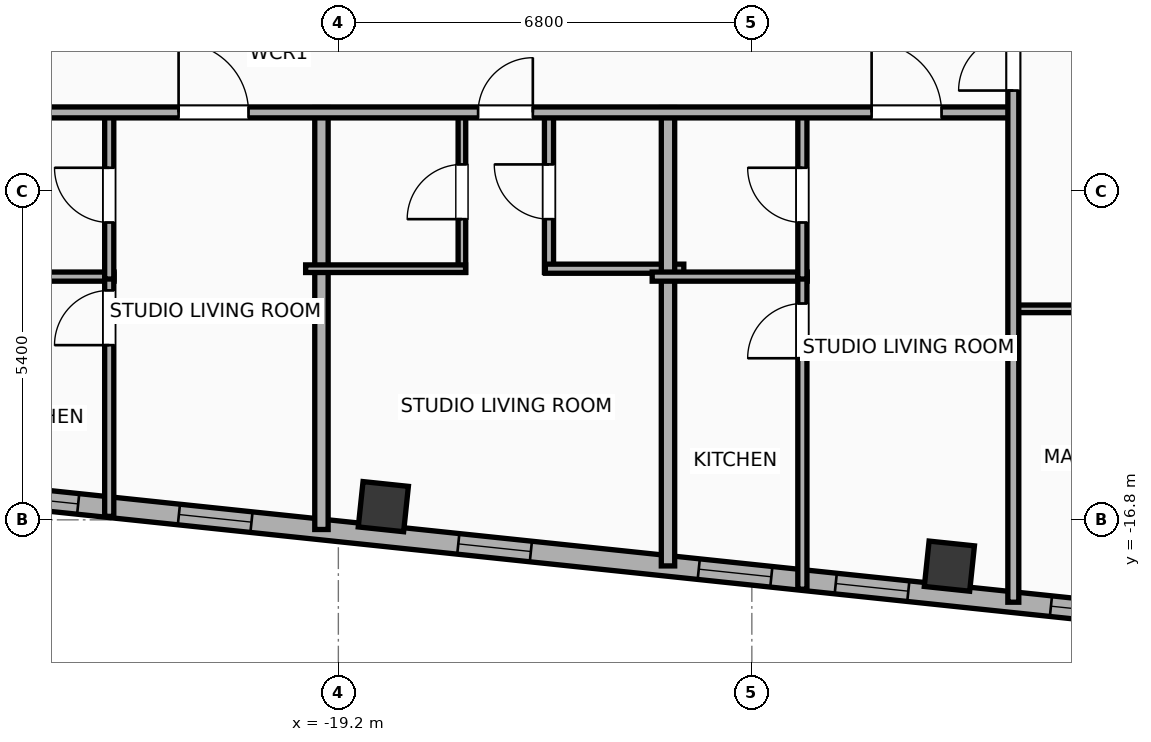
"""IFC4 building model, lengths in metres.
Left out: names, types, materials, properties, quantities, classifications, styles, units other than length and angle.
Written with IfcOpenShell. Run it as: python <this file> out.ifc"""

import sys

from ifc_helpers import new_model, si_unit, direction, frame, frame_2d, origin, origin_2d, place, context, subcontext, project, spatial, rectangle, hollow_rectangle, extrude, element, fill, save


model = new_model("IFC4")
c1 = context("Model", 3, precision=1e-05, world=origin(), true_north=direction((0.0, 1.0)))
c2 = subcontext(c1, "Body", "Model", "MODEL_VIEW")
j1 = project(units=[si_unit("LENGTHUNIT", "METRE"), si_unit("PLANEANGLEUNIT", "RADIAN")], contexts=[c1])
p1 = place(None, origin())
s1 = spatial("IfcSite", under=j1, at=p1, CompositionType="ELEMENT")
p2 = place(p1, origin())
s2 = spatial("IfcBuilding", under=s1, at=p2, CompositionType="ELEMENT")
p3 = place(p2, frame((0.0, 0.0, 299.0)))
s3 = spatial("IfcBuildingStorey", under=s2, at=p3, CompositionType="ELEMENT", Elevation=299.0)
for number, where, z_axis, x_axis in (
    (1, (-18.46, -16.583, 0.0), (0.0, 0.0, 1.0), (0.995, -0.105, 0.0)),
    (2, (-9.152, -17.561, 0.0), (0.0, 0.0, 1.0), (0.995, -0.105, 0.0)),
):
    element("IfcColumn", number, at=place(p3, frame(where, z_axis=z_axis, x_axis=x_axis)), inside=s3, PredefinedType="COLUMN", context=c2, shape_type="SweptSolid", body=[
        extrude(hollow_rectangle(XDim=0.75, YDim=0.75, WallThickness=0.025, at=origin_2d()), origin(), (0.0, 0.0, 1.0), 3.9),
    ])
p4 = place(p3, frame((18.708, -20.972, 0.0), z_axis=(0.0, 0.0, 1.0), x_axis=(-0.994521888554, 0.104528528102, 0.0)))
e3 = element("IfcWall", 3, at=p4, inside=s3, PredefinedType="ELEMENTEDWALL", context=c2, shape_type="SweptSolid", body=[
    extrude(rectangle(XDim=46.766, YDim=0.34, at=frame_2d((23.383, 0.0))), origin(), (0.0, 0.0, 1.0), 3.635),
])
p5 = place(p4, frame((23.733, 0.0, 0.65)))
e4 = element("IfcOpeningElement", 4, at=p5, cuts=e3, PredefinedType="OPENING", context=c2, shape_type="SweptSolid", body=[
    extrude(rectangle(XDim=2.6, YDim=2.45, at=frame_2d((1.3, 1.225))), frame((0.0, 0.18, 0.0), z_axis=(0.0, -1.0, 0.0), x_axis=(1.0, 0.0, 0.0)), (0.0, 0.0, 1.0), 0.36),
])
p6 = place(p4, frame((44.402, 0.0, 0.75)))
e5 = element("IfcOpeningElement", 5, at=p6, cuts=e3, PredefinedType="OPENING", context=c2, shape_type="SweptSolid", body=[
    extrude(rectangle(XDim=1.2, YDim=2.05, at=frame_2d((0.6, 1.025))), frame((0.0, 0.18, 0.0), z_axis=(0.0, -1.0, 0.0), x_axis=(1.0, 0.0, 0.0)), (0.0, 0.0, 1.0), 0.36),
])
p7 = place(p4, frame((39.553, 0.0, 0.75)))
e6 = element("IfcOpeningElement", 6, at=p7, cuts=e3, PredefinedType="OPENING", context=c2, shape_type="SweptSolid", body=[
    extrude(rectangle(XDim=1.2, YDim=2.05, at=frame_2d((0.6, 1.025))), frame((0.0, 0.18, 0.0), z_axis=(0.0, -1.0, 0.0), x_axis=(1.0, 0.0, 0.0)), (0.0, 0.0, 1.0), 0.36),
])
p8 = place(p4, frame((42.419, 0.0, 0.75)))
e7 = element("IfcOpeningElement", 7, at=p8, cuts=e3, PredefinedType="OPENING", context=c2, shape_type="SweptSolid", body=[
    extrude(rectangle(XDim=1.2, YDim=2.05, at=frame_2d((0.6, 1.025))), frame((0.0, 0.18, 0.0), z_axis=(0.0, -1.0, 0.0), x_axis=(1.0, 0.0, 0.0)), (0.0, 0.0, 1.0), 0.36),
])
p9 = place(p4, frame((34.933, 0.0, 0.75)))
e8 = element("IfcOpeningElement", 8, at=p9, cuts=e3, PredefinedType="OPENING", context=c2, shape_type="SweptSolid", body=[
    extrude(rectangle(XDim=1.2, YDim=2.05, at=frame_2d((0.6, 1.025))), frame((0.0, 0.18, 0.0), z_axis=(0.0, -1.0, 0.0), x_axis=(1.0, 0.0, 0.0)), (0.0, 0.0, 1.0), 0.36),
])
p10 = place(p4, frame((28.692, 0.0, 0.75)))
e9 = element("IfcOpeningElement", 9, at=p10, cuts=e3, PredefinedType="OPENING", context=c2, shape_type="SweptSolid", body=[
    extrude(rectangle(XDim=1.2, YDim=2.05, at=frame_2d((0.6, 1.025))), frame((0.0, 0.18, 0.0), z_axis=(0.0, -1.0, 0.0), x_axis=(1.0, 0.0, 0.0)), (0.0, 0.0, 1.0), 0.36),
])
p11 = place(p4, frame((30.957, 0.0, 0.75)))
e10 = element("IfcOpeningElement", 10, at=p11, cuts=e3, PredefinedType="OPENING", context=c2, shape_type="SweptSolid", body=[
    extrude(rectangle(XDim=1.2, YDim=2.05, at=frame_2d((0.6, 1.025))), frame((0.0, 0.18, 0.0), z_axis=(0.0, -1.0, 0.0), x_axis=(1.0, 0.0, 0.0)), (0.0, 0.0, 1.0), 0.36),
])
p12 = place(p4, frame((7.492, 0.0, 0.75)))
e11 = element("IfcOpeningElement", 11, at=p12, cuts=e3, PredefinedType="OPENING", context=c2, shape_type="SweptSolid", body=[
    extrude(rectangle(XDim=1.2, YDim=2.05, at=frame_2d((0.6, 1.025))), frame((0.0, 0.18, 0.0), z_axis=(0.0, -1.0, 0.0), x_axis=(1.0, 0.0, 0.0)), (0.0, 0.0, 1.0), 0.36),
])
p13 = place(p4, frame((4.141, 0.0, 0.75)))
e12 = element("IfcOpeningElement", 12, at=p13, cuts=e3, PredefinedType="OPENING", context=c2, shape_type="SweptSolid", body=[
    extrude(rectangle(XDim=1.2, YDim=2.05, at=frame_2d((0.6, 1.025))), frame((0.0, 0.18, 0.0), z_axis=(0.0, -1.0, 0.0), x_axis=(1.0, 0.0, 0.0)), (0.0, 0.0, 1.0), 0.36),
])
p14 = place(p4, frame((1.36, 0.0, 0.75)))
e13 = element("IfcOpeningElement", 13, at=p14, cuts=e3, PredefinedType="OPENING", context=c2, shape_type="SweptSolid", body=[
    extrude(rectangle(XDim=1.2, YDim=2.05, at=frame_2d((0.6, 1.025))), frame((0.0, 0.18, 0.0), z_axis=(0.0, -1.0, 0.0), x_axis=(1.0, 0.0, 0.0)), (0.0, 0.0, 1.0), 0.36),
])
p15 = place(p4, frame((20.254, 0.0, 0.75)))
e14 = element("IfcOpeningElement", 14, at=p15, cuts=e3, PredefinedType="OPENING", context=c2, shape_type="SweptSolid", body=[
    extrude(rectangle(XDim=1.2, YDim=2.05, at=frame_2d((0.6, 1.025))), frame((0.0, 0.18, 0.0), z_axis=(0.0, -1.0, 0.0), x_axis=(1.0, 0.0, 0.0)), (0.0, 0.0, 1.0), 0.36),
])
p16 = place(p4, frame((16.172, 0.0, 0.75)))
e15 = element("IfcOpeningElement", 15, at=p16, cuts=e3, PredefinedType="OPENING", context=c2, shape_type="SweptSolid", body=[
    extrude(rectangle(XDim=1.2, YDim=2.05, at=frame_2d((0.6, 1.025))), frame((0.0, 0.18, 0.0), z_axis=(0.0, -1.0, 0.0), x_axis=(1.0, 0.0, 0.0)), (0.0, 0.0, 1.0), 0.36),
])
p17 = place(p4, frame((12.11, 0.0, 0.75)))
e16 = element("IfcOpeningElement", 16, at=p17, cuts=e3, PredefinedType="OPENING", context=c2, shape_type="SweptSolid", body=[
    extrude(rectangle(XDim=1.2, YDim=2.05, at=frame_2d((0.6, 1.025))), frame((0.0, 0.18, 0.0), z_axis=(0.0, -1.0, 0.0), x_axis=(1.0, 0.0, 0.0)), (0.0, 0.0, 1.0), 0.36),
])
p18 = place(p3, frame((-25.438, -12.8, 0.0), z_axis=(0.0, 0.0, 1.0), x_axis=(1.0, 0.0, 0.0)))
e17 = element("IfcWall", 17, at=p18, inside=s3, PredefinedType="PLUMBINGWALL", context=c2, shape_type="SweptSolid", body=[
    extrude(rectangle(XDim=2.55, YDim=0.15, at=frame_2d((1.275, 0.0))), origin(), (0.0, 0.0, 1.0), 3.635),
])
p19 = place(p3, frame((-22.968, -16.743, 0.0), z_axis=(0.0, 0.0, 1.0), x_axis=(0.0, 1.0, 0.0)))
e18 = element("IfcWall", 18, at=p19, inside=s3, PredefinedType="PLUMBINGWALL", context=c2, shape_type="SweptSolid", body=[
    extrude(rectangle(XDim=3.983, YDim=0.15, at=frame_2d((1.991, 0.0))), origin(), (0.0, 0.0, 1.0), 3.635),
])
p20 = place(p19, frame((2.816, 0.0, 0.0)))
e19 = element("IfcOpeningElement", 19, at=p20, cuts=e18, PredefinedType="OPENING", context=c2, shape_type="SweptSolid", body=[
    extrude(rectangle(XDim=0.9, YDim=2.05, at=frame_2d((0.45, 1.025))), frame((0.0, 0.085, 0.0), z_axis=(0.0, -1.0, 0.0), x_axis=(1.0, 0.0, 0.0)), (0.0, 0.0, 1.0), 0.17),
])
p21 = place(p3, frame((-22.968, -12.84, 0.0), z_axis=(0.0, 0.0, 1.0), x_axis=(0.0, 1.0, 0.0)))
e20 = element("IfcWall", 20, at=p21, inside=s3, PredefinedType="PLUMBINGWALL", context=c2, shape_type="SweptSolid", body=[
    extrude(rectangle(XDim=2.76, YDim=0.15, at=frame_2d((1.38, 0.0))), origin(), (0.0, 0.0, 1.0), 3.635),
])
p22 = place(p21, frame((0.93, 0.0, 0.0)))
e21 = element("IfcOpeningElement", 21, at=p22, cuts=e20, PredefinedType="OPENING", context=c2, shape_type="SweptSolid", body=[
    extrude(rectangle(XDim=0.9, YDim=2.05, at=frame_2d((0.45, 1.025))), frame((0.0, 0.085, 0.0), z_axis=(0.0, -1.0, 0.0), x_axis=(1.0, 0.0, 0.0)), (0.0, 0.0, 1.0), 0.17),
])
p23 = place(p3, frame((-19.478, -16.959, 0.0), z_axis=(0.0, 0.0, 1.0), x_axis=(0.0, 1.0, 0.0)))
e22 = element("IfcWall", 22, at=p23, inside=s3, PredefinedType="PARTITIONING", context=c2, shape_type="SweptSolid", body=[
    extrude(rectangle(XDim=6.939, YDim=0.22, at=frame_2d((3.469, 0.0))), origin(), (0.0, 0.0, 1.0), 3.635),
])
p24 = place(p3, frame((-17.168, -12.73, 0.0), z_axis=(0.0, 0.0, 1.0), x_axis=(0.0, 1.0, 0.0)))
e23 = element("IfcWall", 23, at=p24, inside=s3, PredefinedType="PARTITIONING", context=c2, shape_type="SweptSolid", body=[
    extrude(rectangle(XDim=2.65, YDim=0.125, at=frame_2d((1.325, 0.0))), origin(), (0.0, 0.0, 1.0), 3.635),
])
p25 = place(p24, frame((0.875, 0.0, 0.0)))
e24 = element("IfcOpeningElement", 24, at=p25, cuts=e23, PredefinedType="OPENING", context=c2, shape_type="SweptSolid", body=[
    extrude(rectangle(XDim=0.9, YDim=2.05, at=frame_2d((0.45, 1.025))), frame((0.0, 0.073, 0.0), z_axis=(0.0, -1.0, 0.0), x_axis=(1.0, 0.0, 0.0)), (0.0, 0.0, 1.0), 0.145),
])
p26 = place(p3, frame((-15.736, -12.73, 0.0), z_axis=(0.0, 0.0, 1.0), x_axis=(0.0, 1.0, 0.0)))
e25 = element("IfcWall", 25, at=p26, inside=s3, PredefinedType="PLUMBINGWALL", context=c2, shape_type="SweptSolid", body=[
    extrude(rectangle(XDim=2.65, YDim=0.15, at=frame_2d((1.325, 0.0))), origin(), (0.0, 0.0, 1.0), 3.635),
])
p27 = place(p26, frame((0.875, 0.0, 0.0)))
e26 = element("IfcOpeningElement", 26, at=p27, cuts=e25, PredefinedType="OPENING", context=c2, shape_type="SweptSolid", body=[
    extrude(rectangle(XDim=0.9, YDim=2.05, at=frame_2d((0.45, 1.025))), frame((0.0, 0.085, 0.0), z_axis=(0.0, -1.0, 0.0), x_axis=(1.0, 0.0, 0.0)), (0.0, 0.0, 1.0), 0.17),
])
p28 = place(p3, frame((-19.738, -12.67, 0.0), z_axis=(0.0, 0.0, 1.0), x_axis=(1.0, 0.0, 0.0)))
e27 = element("IfcWall", 27, at=p28, inside=s3, PredefinedType="PARTITIONING", context=c2, shape_type="SweptSolid", body=[
    extrude(rectangle(XDim=2.63, YDim=0.125, at=frame_2d((1.315, 0.0))), origin(), (0.0, 0.0, 1.0), 3.635),
])
p29 = place(p3, frame((-15.796, -12.67, 0.0), z_axis=(0.0, 0.0, 1.0), x_axis=(1.0, 0.0, 0.0)))
e28 = element("IfcWall", 28, at=p29, inside=s3, PredefinedType="PLUMBINGWALL", context=c2, shape_type="SweptSolid", body=[
    extrude(rectangle(XDim=2.277, YDim=0.15, at=frame_2d((1.138, 0.0))), origin(), (0.0, 0.0, 1.0), 3.635),
])
p30 = place(p3, frame((-13.779, -17.558, 0.0), z_axis=(0.0, 0.0, 1.0), x_axis=(0.0, 1.0, 0.0)))
e29 = element("IfcWall", 29, at=p30, inside=s3, PredefinedType="PARTITIONING", context=c2, shape_type="SweptSolid", body=[
    extrude(rectangle(XDim=7.538, YDim=0.22, at=frame_2d((3.769, 0.0))), origin(), (0.0, 0.0, 1.0), 3.635),
])
p31 = place(p3, frame((-14.039, -12.8, 0.0), z_axis=(0.0, 0.0, 1.0), x_axis=(1.0, 0.0, 0.0)))
e30 = element("IfcWall", 30, at=p31, inside=s3, PredefinedType="PLUMBINGWALL", context=c2, shape_type="SweptSolid", body=[
    extrude(rectangle(XDim=2.55, YDim=0.15, at=frame_2d((1.275, 0.0))), origin(), (0.0, 0.0, 1.0), 3.635),
])
p32 = place(p3, frame((-11.569, -17.941, 0.0), z_axis=(0.0, 0.0, 1.0), x_axis=(0.0, 1.0, 0.0)))
e31 = element("IfcWall", 31, at=p32, inside=s3, PredefinedType="PLUMBINGWALL", context=c2, shape_type="SweptSolid", body=[
    extrude(rectangle(XDim=5.181, YDim=0.15, at=frame_2d((2.59, 0.0))), origin(), (0.0, 0.0, 1.0), 3.635),
])
p33 = place(p32, frame((3.798, 0.0, 0.0)))
e32 = element("IfcOpeningElement", 32, at=p33, cuts=e31, PredefinedType="OPENING", context=c2, shape_type="SweptSolid", body=[
    extrude(rectangle(XDim=0.9, YDim=2.05, at=frame_2d((0.45, 1.025))), frame((0.0, 0.085, 0.0), z_axis=(0.0, -1.0, 0.0), x_axis=(1.0, 0.0, 0.0)), (0.0, 0.0, 1.0), 0.17),
])
p34 = place(p3, frame((-11.569, -12.84, 0.0), z_axis=(0.0, 0.0, 1.0), x_axis=(0.0, 1.0, 0.0)))
e33 = element("IfcWall", 33, at=p34, inside=s3, PredefinedType="PLUMBINGWALL", context=c2, shape_type="SweptSolid", body=[
    extrude(rectangle(XDim=2.76, YDim=0.15, at=frame_2d((1.38, 0.0))), origin(), (0.0, 0.0, 1.0), 3.075),
])
p35 = place(p34, frame((0.93, 0.0, 0.0)))
e34 = element("IfcOpeningElement", 34, at=p35, cuts=e33, PredefinedType="OPENING", context=c2, shape_type="SweptSolid", body=[
    extrude(rectangle(XDim=0.9, YDim=2.05, at=frame_2d((0.45, 1.025))), frame((0.0, 0.085, 0.0), z_axis=(0.0, -1.0, 0.0), x_axis=(1.0, 0.0, 0.0)), (0.0, 0.0, 1.0), 0.17),
])
p36 = place(p3, frame((-30.639, -10.1, 0.0), z_axis=(0.0, 0.0, 1.0), x_axis=(1.0, 0.0, 0.0)))
e35 = element("IfcWall", 35, at=p36, inside=s3, PredefinedType="PARTITIONING", context=c2, shape_type="SweptSolid", body=[
    extrude(rectangle(XDim=22.559, YDim=0.18, at=frame_2d((11.28, 0.0))), origin(), (0.0, 0.0, 1.0), 3.635),
])
p37 = place(p36, frame((2.298, 0.0, 0.0)))
e36 = element("IfcOpeningElement", 36, at=p37, cuts=e35, PredefinedType="OPENING", context=c2, shape_type="SweptSolid", body=[
    extrude(rectangle(XDim=0.9, YDim=2.05, at=frame_2d((0.45, 1.025))), frame((0.0, 0.1, 0.0), z_axis=(0.0, -1.0, 0.0), x_axis=(1.0, 0.0, 0.0)), (0.0, 0.0, 1.0), 0.2),
])
p38 = place(p36, frame((8.812, 0.0, 0.0)))
e37 = element("IfcOpeningElement", 37, at=p38, cuts=e35, PredefinedType="OPENING", context=c2, shape_type="SweptSolid", body=[
    extrude(rectangle(XDim=1.15, YDim=2.05, at=frame_2d((0.575, 1.025))), frame((0.0, 0.1, 0.0), z_axis=(0.0, -1.0, 0.0), x_axis=(1.0, 0.0, 0.0)), (0.0, 0.0, 1.0), 0.2),
])
p39 = place(p36, frame((13.738, 0.0, 0.0)))
e38 = element("IfcOpeningElement", 38, at=p39, cuts=e35, PredefinedType="OPENING", context=c2, shape_type="SweptSolid", body=[
    extrude(rectangle(XDim=0.9, YDim=2.05, at=frame_2d((0.45, 1.025))), frame((0.0, 0.1, 0.0), z_axis=(0.0, -1.0, 0.0), x_axis=(1.0, 0.0, 0.0)), (0.0, 0.0, 1.0), 0.2),
])
p40 = place(p36, frame((20.209, 0.0, 0.0)))
e39 = element("IfcOpeningElement", 39, at=p40, cuts=e35, PredefinedType="OPENING", context=c2, shape_type="SweptSolid", body=[
    extrude(rectangle(XDim=1.15, YDim=2.05, at=frame_2d((0.575, 1.025))), frame((0.0, 0.1, 0.0), z_axis=(0.0, -1.0, 0.0), x_axis=(1.0, 0.0, 0.0)), (0.0, 0.0, 1.0), 0.2),
])
p41 = place(p3, frame((-8.08, -13.33, 0.0), z_axis=(0.0, 0.0, 1.0), x_axis=(1.0, 0.0, 0.0)))
e40 = element("IfcWall", 40, at=p41, inside=s3, PredefinedType="PARTITIONING", context=c2, shape_type="SweptSolid", body=[
    extrude(rectangle(XDim=8.06, YDim=0.125, at=frame_2d((4.03, 0.0))), origin(), (0.0, 0.0, 1.0), 3.635),
])
p42 = place(p41, frame((1.323, 0.0, 0.0)))
e41 = element("IfcOpeningElement", 41, at=p42, cuts=e40, PredefinedType="OPENING", context=c2, shape_type="SweptSolid", body=[
    extrude(rectangle(XDim=0.9, YDim=2.05, at=frame_2d((0.45, 1.025))), frame((0.0, 0.073, 0.0), z_axis=(0.0, -1.0, 0.0), x_axis=(1.0, 0.0, 0.0)), (0.0, 0.0, 1.0), 0.145),
])
p43 = place(p41, frame((4.547, 0.0, 0.0)))
e42 = element("IfcOpeningElement", 42, at=p43, cuts=e40, PredefinedType="OPENING", context=c2, shape_type="SweptSolid", body=[
    extrude(rectangle(XDim=0.9, YDim=2.05, at=frame_2d((0.45, 1.025))), frame((0.0, 0.073, 0.0), z_axis=(0.0, -1.0, 0.0), x_axis=(1.0, 0.0, 0.0)), (0.0, 0.0, 1.0), 0.145),
])
p44 = place(p3, frame((-8.1, -18.155, 0.0), z_axis=(0.0, 0.0, 1.0), x_axis=(0.0, 1.0, 0.0)))
e43 = element("IfcWall", 43, at=p44, inside=s3, PredefinedType="PARTITIONING", context=c2, shape_type="SweptSolid", body=[
    extrude(rectangle(XDim=9.665, YDim=0.18, at=frame_2d((4.832, 0.0))), origin(), (0.0, 0.0, 1.0), 3.635),
])
p45 = place(p44, frame((8.414, 0.0, 0.0)))
e44 = element("IfcOpeningElement", 44, at=p45, cuts=e43, PredefinedType="OPENING", context=c2, shape_type="SweptSolid", body=[
    extrude(rectangle(XDim=0.9, YDim=2.05, at=frame_2d((0.45, 1.025))), frame((0.0, 0.1, 0.0), z_axis=(0.0, -1.0, 0.0), x_axis=(1.0, 0.0, 0.0)), (0.0, 0.0, 1.0), 0.2),
])
p46 = place(p5, origin())
e45 = element("IfcWindow", 45, at=p46, inside=s3, PartitioningType="SINGLE_PANEL", PredefinedType="WINDOW", context=c2, shape_type="SweptSolid", body=[
    extrude(rectangle(XDim=2.6, YDim=2.45, at=frame_2d((1.3, 1.225))), frame((0.0, 0.03, 0.0), z_axis=(0.0, -1.0, 0.0), x_axis=(1.0, 0.0, 0.0)), (0.0, 0.0, 1.0), 0.06),
])
fill(e4, e45)
p47 = place(p7, origin())
e46 = element("IfcWindow", 46, at=p47, inside=s3, PartitioningType="SINGLE_PANEL", PredefinedType="WINDOW", context=c2, shape_type="SweptSolid", body=[
    extrude(rectangle(XDim=1.2, YDim=2.05, at=frame_2d((0.6, 1.025))), frame((0.0, 0.03, 0.0), z_axis=(0.0, -1.0, 0.0), x_axis=(1.0, 0.0, 0.0)), (0.0, 0.0, 1.0), 0.06),
])
fill(e6, e46)
p48 = place(p8, origin())
e47 = element("IfcWindow", 47, at=p48, inside=s3, PartitioningType="SINGLE_PANEL", PredefinedType="WINDOW", context=c2, shape_type="SweptSolid", body=[
    extrude(rectangle(XDim=1.2, YDim=2.05, at=frame_2d((0.6, 1.025))), frame((0.0, 0.03, 0.0), z_axis=(0.0, -1.0, 0.0), x_axis=(1.0, 0.0, 0.0)), (0.0, 0.0, 1.0), 0.06),
])
fill(e7, e47)
p49 = place(p9, origin())
e48 = element("IfcWindow", 48, at=p49, inside=s3, PartitioningType="SINGLE_PANEL", PredefinedType="WINDOW", context=c2, shape_type="SweptSolid", body=[
    extrude(rectangle(XDim=1.2, YDim=2.05, at=frame_2d((0.6, 1.025))), frame((0.0, 0.03, 0.0), z_axis=(0.0, -1.0, 0.0), x_axis=(1.0, 0.0, 0.0)), (0.0, 0.0, 1.0), 0.06),
])
fill(e8, e48)
p50 = place(p10, origin())
e49 = element("IfcWindow", 49, at=p50, inside=s3, PartitioningType="SINGLE_PANEL", PredefinedType="WINDOW", context=c2, shape_type="SweptSolid", body=[
    extrude(rectangle(XDim=1.2, YDim=2.05, at=frame_2d((0.6, 1.025))), frame((0.0, 0.03, 0.0), z_axis=(0.0, -1.0, 0.0), x_axis=(1.0, 0.0, 0.0)), (0.0, 0.0, 1.0), 0.06),
])
fill(e9, e49)
p51 = place(p11, origin())
e50 = element("IfcWindow", 50, at=p51, inside=s3, PartitioningType="SINGLE_PANEL", PredefinedType="WINDOW", context=c2, shape_type="SweptSolid", body=[
    extrude(rectangle(XDim=1.2, YDim=2.05, at=frame_2d((0.6, 1.025))), frame((0.0, 0.03, 0.0), z_axis=(0.0, -1.0, 0.0), x_axis=(1.0, 0.0, 0.0)), (0.0, 0.0, 1.0), 0.06),
])
fill(e10, e50)
p52 = place(p20, origin())
e51 = element("IfcDoor", 51, at=p52, inside=s3, OperationType="SINGLE_SWING_LEFT", PredefinedType="DOOR", context=c2, shape_type="SweptSolid", body=[
    extrude(rectangle(XDim=0.9, YDim=2.05, at=frame_2d((0.45, 1.025))), frame((0.0, 0.025, 0.0), z_axis=(0.0, -1.0, 0.0), x_axis=(1.0, 0.0, 0.0)), (0.0, 0.0, 1.0), 0.05),
])
fill(e19, e51)
p53 = place(p22, origin())
e52 = element("IfcDoor", 52, at=p53, inside=s3, OperationType="SINGLE_SWING_RIGHT", PredefinedType="DOOR", context=c2, shape_type="SweptSolid", body=[
    extrude(rectangle(XDim=0.9, YDim=2.05, at=frame_2d((0.45, 1.025))), frame((0.0, 0.025, 0.0), z_axis=(0.0, -1.0, 0.0), x_axis=(1.0, 0.0, 0.0)), (0.0, 0.0, 1.0), 0.05),
])
fill(e21, e52)
p54 = place(p25, origin())
e53 = element("IfcDoor", 53, at=p54, inside=s3, OperationType="SINGLE_SWING_LEFT", PredefinedType="DOOR", context=c2, shape_type="SweptSolid", body=[
    extrude(rectangle(XDim=0.9, YDim=2.05, at=frame_2d((0.45, 1.025))), frame((0.0, 0.025, 0.0), z_axis=(0.0, -1.0, 0.0), x_axis=(1.0, 0.0, 0.0)), (0.0, 0.0, 1.0), 0.05),
])
fill(e24, e53)
p55 = place(p27, origin())
e54 = element("IfcDoor", 54, at=p55, inside=s3, OperationType="SINGLE_SWING_RIGHT", PredefinedType="DOOR", context=c2, shape_type="SweptSolid", body=[
    extrude(rectangle(XDim=0.9, YDim=2.05, at=frame_2d((0.45, 1.025))), frame((0.0, 0.025, 0.0), z_axis=(0.0, -1.0, 0.0), x_axis=(1.0, 0.0, 0.0)), (0.0, 0.0, 1.0), 0.05),
])
fill(e26, e54)
p56 = place(p33, origin())
e55 = element("IfcDoor", 55, at=p56, inside=s3, OperationType="SINGLE_SWING_LEFT", PredefinedType="DOOR", context=c2, shape_type="SweptSolid", body=[
    extrude(rectangle(XDim=0.9, YDim=2.05, at=frame_2d((0.45, 1.025))), frame((0.0, 0.025, 0.0), z_axis=(0.0, -1.0, 0.0), x_axis=(1.0, 0.0, 0.0)), (0.0, 0.0, 1.0), 0.05),
])
fill(e32, e55)
p57 = place(p35, origin())
e56 = element("IfcDoor", 56, at=p57, inside=s3, OperationType="SINGLE_SWING_RIGHT", PredefinedType="DOOR", context=c2, shape_type="SweptSolid", body=[
    extrude(rectangle(XDim=0.9, YDim=2.05, at=frame_2d((0.45, 1.025))), frame((0.0, 0.025, 0.0), z_axis=(0.0, -1.0, 0.0), x_axis=(1.0, 0.0, 0.0)), (0.0, 0.0, 1.0), 0.05),
])
fill(e34, e56)
p58 = place(p38, origin())
e57 = element("IfcDoor", 57, at=p58, inside=s3, OperationType="SINGLE_SWING_LEFT", PredefinedType="DOOR", context=c2, shape_type="SweptSolid", body=[
    extrude(rectangle(XDim=1.15, YDim=2.05, at=frame_2d((0.575, 1.025))), frame((0.0, 0.025, 0.0), z_axis=(0.0, -1.0, 0.0), x_axis=(1.0, 0.0, 0.0)), (0.0, 0.0, 1.0), 0.05),
])
fill(e37, e57)
p59 = place(p39, origin())
e58 = element("IfcDoor", 58, at=p59, inside=s3, OperationType="SINGLE_SWING_RIGHT", PredefinedType="DOOR", context=c2, shape_type="SweptSolid", body=[
    extrude(rectangle(XDim=0.9, YDim=2.05, at=frame_2d((0.45, 1.025))), frame((0.0, 0.025, 0.0), z_axis=(0.0, -1.0, 0.0), x_axis=(1.0, 0.0, 0.0)), (0.0, 0.0, 1.0), 0.05),
])
fill(e38, e58)
p60 = place(p40, origin())
e59 = element("IfcDoor", 59, at=p60, inside=s3, OperationType="SINGLE_SWING_LEFT", PredefinedType="DOOR", context=c2, shape_type="SweptSolid", body=[
    extrude(rectangle(XDim=1.15, YDim=2.05, at=frame_2d((0.575, 1.025))), frame((0.0, 0.025, 0.0), z_axis=(0.0, -1.0, 0.0), x_axis=(1.0, 0.0, 0.0)), (0.0, 0.0, 1.0), 0.05),
])
fill(e39, e59)
p61 = place(p45, origin())
e60 = element("IfcDoor", 60, at=p61, inside=s3, OperationType="SINGLE_SWING_LEFT", PredefinedType="DOOR", context=c2, shape_type="SweptSolid", body=[
    extrude(rectangle(XDim=0.9, YDim=2.05, at=frame_2d((0.45, 1.025))), frame((0.0, 0.025, 0.0), z_axis=(0.0, -1.0, 0.0), x_axis=(1.0, 0.0, 0.0)), (0.0, 0.0, 1.0), 0.05),
])
fill(e44, e60)
save(model, sys.argv[1])
